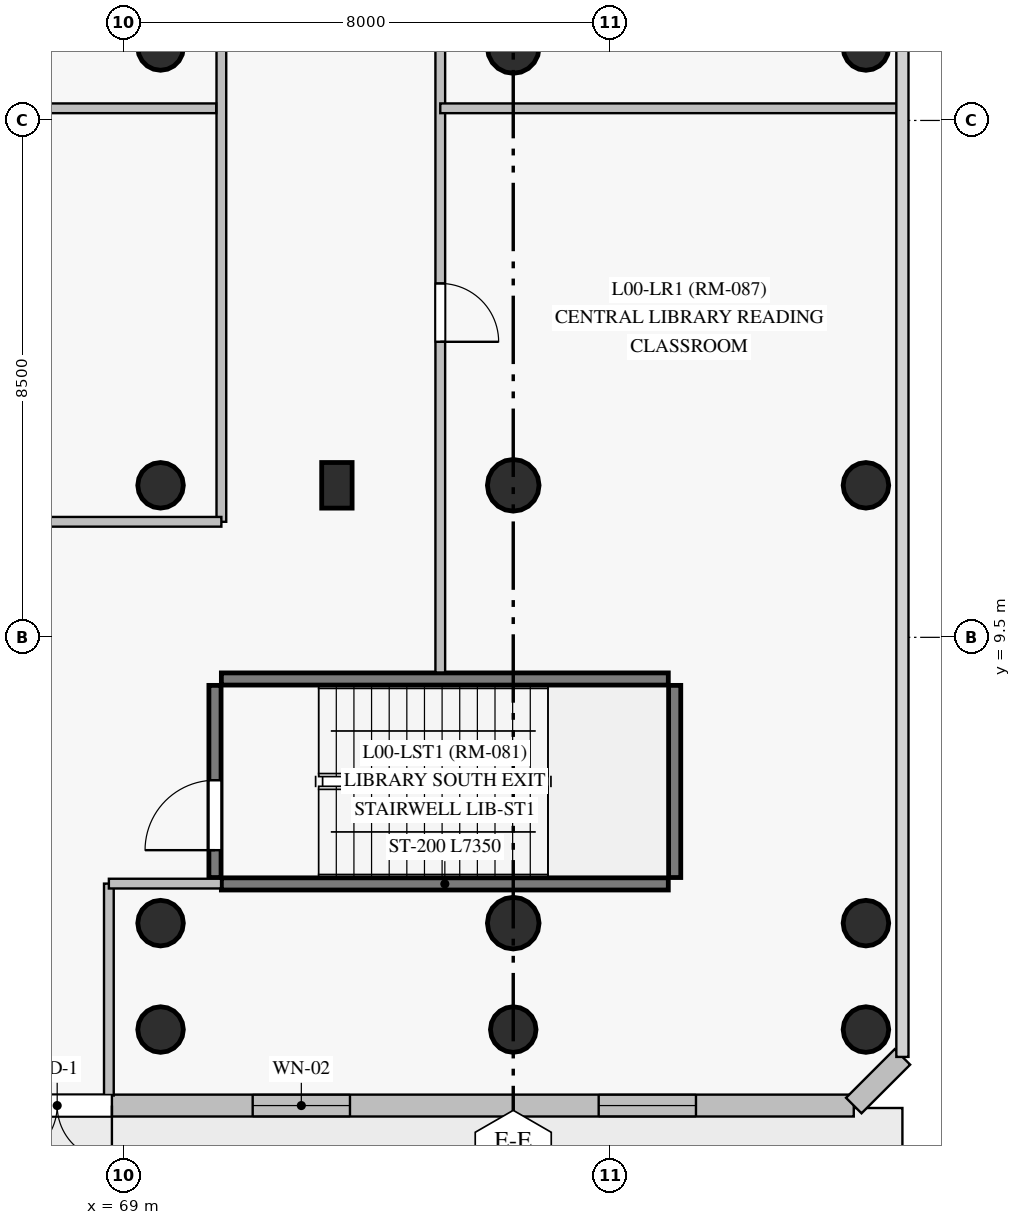
"""IFC4 building model, lengths in metres.
Left out: names, types, materials, properties, quantities, classifications, styles, units other than length and angle.
Written with IfcOpenShell. Run it as: python <this file> out.ifc"""

import sys

from ifc_helpers import new_model, si_unit, direction, frame, frame_2d, origin, origin_with_axes, origin_2d, place, context, subcontext, project, spatial, rectangle, circle, extrude, source, transform, mapped, element, fill, save


model = new_model("IFC4")
c1 = context("Model", 3, precision=1e-05, world=origin(), true_north=direction((0.0, 1.0)))
c2 = subcontext(c1, "Body", "Model", "MODEL_VIEW")
j1 = project(units=[si_unit("LENGTHUNIT", "METRE"), si_unit("PLANEANGLEUNIT", "RADIAN")], contexts=[c1])
p1 = place(None, origin())
s1 = spatial("IfcSite", under=j1, at=p1, CompositionType="ELEMENT")
p2 = place(p1, origin())
s2 = spatial("IfcBuilding", under=s1, at=p2, CompositionType="ELEMENT")
p3 = place(p2, origin())
s3 = spatial("IfcBuildingStorey", under=s2, at=p3, CompositionType="ELEMENT", Elevation=0.0)
m1 = source(origin_with_axes(), c2, "Body", "SweptSolid", [
    extrude(circle(Radius=0.375, at=origin_2d()), origin(), (0.0, 0.0, 1.0), 4.5),
])
for number, where, z_axis, x_axis in (
    (1, (69.6, 3.05, 0.0), (0.0, 0.0, 1.0), (1.0, 0.0, 0.0)),
    (2, (75.4, 3.05, 0.0), (0.0, 0.0, 1.0), (1.0, 0.0, 0.0)),
    (3, (81.2, 3.05, 0.0), (0.0, 0.0, 1.0), (1.0, 0.0, 0.0)),
    (4, (69.6, 4.8, 0.0), (0.0, 0.0, 1.0), (1.0, 0.0, 0.0)),
    (5, (69.6, 12.0, 0.0), (0.0, 0.0, 1.0), (1.0, 0.0, 0.0)),
    (6, (69.6, 19.2, 0.0), (0.0, 0.0, 1.0), (1.0, 0.0, 0.0)),
):
    element("IfcColumn", number, at=place(p3, frame(where, z_axis=z_axis, x_axis=x_axis)), inside=s3, PredefinedType="COLUMN", context=c2, shape_type="MappedRepresentation", body=[
        mapped(m1, transform((0.0, 0.0, 0.0), scale=1.0)),
    ])
m2 = source(origin_with_axes(), c2, "Body", "SweptSolid", [
    extrude(circle(Radius=0.425, at=origin_2d()), origin(), (0.0, 0.0, 1.0), 4.5),
])
for number, where, z_axis, x_axis in (
    (7, (75.4, 4.8, 0.0), (0.0, 0.0, 1.0), (1.0, 0.0, 0.0)),
    (8, (75.4, 12.0, 0.0), (0.0, 0.0, 1.0), (1.0, 0.0, 0.0)),
    (9, (75.4, 19.2, 0.0), (0.0, 0.0, 1.0), (1.0, 0.0, 0.0)),
):
    element("IfcColumn", number, at=place(p3, frame(where, z_axis=z_axis, x_axis=x_axis)), inside=s3, PredefinedType="COLUMN", context=c2, shape_type="MappedRepresentation", body=[
        mapped(m2, transform((0.0, 0.0, 0.0), scale=1.0)),
    ])
for number, where, z_axis, x_axis in (
    (10, (81.2, 4.8, 0.0), (0.0, 0.0, 1.0), (1.0, 0.0, 0.0)),
    (11, (81.2, 12.0, 0.0), (0.0, 0.0, 1.0), (1.0, 0.0, 0.0)),
    (12, (81.2, 19.2, 0.0), (0.0, 0.0, 1.0), (1.0, 0.0, 0.0)),
):
    element("IfcColumn", number, at=place(p3, frame(where, z_axis=z_axis, x_axis=x_axis)), inside=s3, PredefinedType="COLUMN", context=c2, shape_type="MappedRepresentation", body=[
        mapped(m1, transform((0.0, 0.0, 0.0), scale=1.0)),
    ])
m3 = source(origin_with_axes(), c2, "Body", "SweptSolid", [
    extrude(rectangle(XDim=0.5, YDim=0.75, at=origin_2d()), origin(), (0.0, 0.0, 1.0), 4.5),
])
p4 = place(p3, frame((72.5, 12.0, 0.0), z_axis=(0.0, 0.0, 1.0), x_axis=(1.0, 0.0, 0.0)))
e13 = element("IfcColumn", 13, at=p4, inside=s3, PredefinedType="PILASTER", context=c2, shape_type="MappedRepresentation", body=[
    mapped(m3, transform((0.0, 0.0, 0.0), scale=1.0)),
])
p5 = place(p3, frame((81.0, 1.8, 0.0), z_axis=(0.0, 0.0, 1.0), x_axis=(-1.0, 0.0, 0.0)))
e14 = element("IfcWall", 14, at=p5, inside=s3, PredefinedType="SOLIDWALL", context=c2, shape_type="SweptSolid", body=[
    extrude(rectangle(XDim=14.8, YDim=0.36, at=frame_2d((7.4, 0.0))), origin(), (0.0, 0.0, 1.0), 4.2),
])
p6 = place(p5, frame((8.285, 0.0, 0.85)))
e15 = element("IfcOpeningElement", 15, at=p6, cuts=e14, PredefinedType="OPENING", context=c2, shape_type="SweptSolid", body=[
    extrude(rectangle(XDim=1.6, YDim=2.2, at=frame_2d((0.8, 1.1))), frame((0.0, 0.19, 0.0), z_axis=(0.0, -1.0, 0.0), x_axis=(1.0, 0.0, 0.0)), (0.0, 0.0, 1.0), 0.38),
])
p7 = place(p5, frame((2.595, 0.0, 0.85)))
e16 = element("IfcOpeningElement", 16, at=p7, cuts=e14, PredefinedType="OPENING", context=c2, shape_type="SweptSolid", body=[
    extrude(rectangle(XDim=1.6, YDim=2.2, at=frame_2d((0.8, 1.1))), frame((0.0, 0.19, 0.0), z_axis=(0.0, -1.0, 0.0), x_axis=(1.0, 0.0, 0.0)), (0.0, 0.0, 1.0), 0.38),
])
p8 = place(p5, frame((12.2, 0.0, 0.0)))
e17 = element("IfcOpeningElement", 17, at=p8, cuts=e14, PredefinedType="OPENING", context=c2, shape_type="SweptSolid", body=[
    extrude(rectangle(XDim=1.8, YDim=2.3, at=frame_2d((0.9, 1.15))), frame((0.0, 0.19, 0.0), z_axis=(0.0, -1.0, 0.0), x_axis=(1.0, 0.0, 0.0)), (0.0, 0.0, 1.0), 0.38),
])
p9 = place(p3, frame((81.0, 1.8, 0.0), z_axis=(0.0, 0.0, 1.0), x_axis=(0.707106781187, 0.707106781187, 0.0)))
e18 = element("IfcWall", 18, at=p9, inside=s3, PredefinedType="SOLIDWALL", context=c2, shape_type="SweptSolid", body=[
    extrude(rectangle(XDim=1.131, YDim=0.36, at=frame_2d((0.566, 0.0))), origin(), (0.0, 0.0, 1.0), 4.2),
])
for number, where, z_axis, x_axis in (
    (19, (70.6, 5.445, 0.0), (0.0, 0.0, 1.0), (1.0, 0.0, 0.0)),
    (20, (70.6, 8.815, 0.0), (0.0, 0.0, 1.0), (1.0, 0.0, 0.0)),
):
    element("IfcWall", number, at=place(p3, frame(where, z_axis=z_axis, x_axis=x_axis)), inside=s3, PredefinedType="SHEAR", context=c2, shape_type="SweptSolid", body=[
        extrude(rectangle(XDim=7.35, YDim=0.2, at=frame_2d((3.675, 0.0))), origin(), (0.0, 0.0, 1.0), 4.2),
    ])
p10 = place(p3, frame((70.495, 5.55, 0.0), z_axis=(0.0, 0.0, 1.0), x_axis=(0.0, 1.0, 0.0)))
e21 = element("IfcWall", 21, at=p10, inside=s3, PredefinedType="SHEAR", context=c2, shape_type="SweptSolid", body=[
    extrude(rectangle(XDim=3.16, YDim=0.2, at=frame_2d((1.58, 0.0))), origin(), (0.0, 0.0, 1.0), 4.2),
])
p11 = place(p10, frame((0.45, 0.0, 0.0)))
e22 = element("IfcOpeningElement", 22, at=p11, cuts=e21, PredefinedType="OPENING", context=c2, shape_type="SweptSolid", body=[
    extrude(rectangle(XDim=1.15, YDim=2.15, at=frame_2d((0.575, 1.075))), frame((0.0, 0.11, 0.0), z_axis=(0.0, -1.0, 0.0), x_axis=(1.0, 0.0, 0.0)), (0.0, 0.0, 1.0), 0.22),
])
p12 = place(p3, frame((78.055, 5.55, 0.0), z_axis=(0.0, 0.0, 1.0), x_axis=(0.0, 1.0, 0.0)))
e23 = element("IfcWall", 23, at=p12, inside=s3, PredefinedType="SHEAR", context=c2, shape_type="SweptSolid", body=[
    extrude(rectangle(XDim=3.16, YDim=0.2, at=frame_2d((1.58, 0.0))), origin(), (0.0, 0.0, 1.0), 4.2),
])
p13 = place(p3, frame((70.6, 11.4, 0.0), z_axis=(0.0, 0.0, 1.0), x_axis=(0.0, 1.0, 0.0)))
e24 = element("IfcWall", 24, at=p13, inside=s3, PredefinedType="PARTITIONING", context=c2, shape_type="SweptSolid", body=[
    extrude(rectangle(XDim=30.2, YDim=0.16, at=frame_2d((15.1, 0.0))), origin(), (0.0, 0.0, 1.0), 4.2),
])
p14 = place(p3, frame((74.2, 20.6, 0.0), z_axis=(0.0, 0.0, 1.0), x_axis=(0.0, -1.0, 0.0)))
e25 = element("IfcWall", 25, at=p14, inside=s3, PredefinedType="PARTITIONING", context=c2, shape_type="SweptSolid", body=[
    extrude(rectangle(XDim=11.678, YDim=0.16, at=frame_2d((5.839, 0.0))), origin(), (0.0, 0.0, 1.0), 4.2),
])
p15 = place(p14, frame((5.28, 0.0, 0.0)))
e26 = element("IfcOpeningElement", 26, at=p15, cuts=e25, PredefinedType="OPENING", context=c2, shape_type="SweptSolid", body=[
    extrude(rectangle(XDim=0.96, YDim=2.15, at=frame_2d((0.48, 1.075))), frame((0.0, 0.09, 0.0), z_axis=(0.0, -1.0, 0.0), x_axis=(1.0, 0.0, 0.0)), (0.0, 0.0, 1.0), 0.18),
])
p16 = place(p3, frame((74.2, 18.2, 0.0), z_axis=(0.0, 0.0, 1.0), x_axis=(1.0, 0.0, 0.0)))
e27 = element("IfcWall", 27, at=p16, inside=s3, PredefinedType="PARTITIONING", context=c2, shape_type="SweptSolid", body=[
    extrude(rectangle(XDim=7.545, YDim=0.16, at=frame_2d((3.772, 0.0))), origin(), (0.0, 0.0, 1.0), 4.2),
])
p17 = place(p3, frame((65.455, 18.2, 0.0), z_axis=(0.0, 0.0, 1.0), x_axis=(1.0, 0.0, 0.0)))
e28 = element("IfcWall", 28, at=p17, inside=s3, PredefinedType="PARTITIONING", context=c2, shape_type="SweptSolid", body=[
    extrude(rectangle(XDim=5.06, YDim=0.16, at=frame_2d((2.53, 0.0))), origin(), (0.0, 0.0, 1.0), 4.2),
])
p18 = place(p3, frame((66.55, 11.4, 0.0), z_axis=(0.0, 0.0, 1.0), x_axis=(1.0, 0.0, 0.0)))
e29 = element("IfcWall", 29, at=p18, inside=s3, PredefinedType="PARTITIONING", context=c2, shape_type="SweptSolid", body=[
    extrude(rectangle(XDim=4.05, YDim=0.16, at=frame_2d((2.025, 0.0))), origin(), (0.0, 0.0, 1.0), 3.55),
])
p19 = place(p3, frame((68.75, 5.45, 0.0), z_axis=(0.0, 0.0, 1.0), x_axis=(0.0, -1.0, 0.0)))
e30 = element("IfcWall", 30, at=p19, inside=s3, PredefinedType="PARTITIONING", context=c2, shape_type="SweptSolid", body=[
    extrude(rectangle(XDim=3.485, YDim=0.16, at=frame_2d((1.742, 0.0))), origin(), (0.0, 0.0, 1.0), 4.2),
])
p20 = place(p3, frame((70.595, 5.45, 0.0), z_axis=(0.0, 0.0, 1.0), x_axis=(-1.0, 0.0, 0.0)))
e31 = element("IfcWall", 31, at=p20, inside=s3, PredefinedType="PARTITIONING", context=c2, shape_type="SweptSolid", body=[
    extrude(rectangle(XDim=1.845, YDim=0.16, at=frame_2d((0.922, 0.0))), origin(), (0.0, 0.0, 1.0), 3.55),
])
m4 = source(origin_with_axes(), c2, "Body", "SweptSolid", [
    extrude(rectangle(XDim=1.6, YDim=2.2, at=frame_2d((0.8, 1.1))), frame((0.0, 0.03, 0.0), z_axis=(0.0, -1.0, 0.0), x_axis=(1.0, 0.0, 0.0)), (0.0, 0.0, 1.0), 0.06),
])
p21 = place(p6, origin())
e32 = element("IfcWindow", 32, at=p21, inside=s3, PartitioningType="SINGLE_PANEL", PredefinedType="WINDOW", context=c2, shape_type="MappedRepresentation", body=[
    mapped(m4, transform((0.0, 0.0, 0.0), scale=1.0)),
])
fill(e15, e32)
p22 = place(p7, origin())
e33 = element("IfcWindow", 33, at=p22, inside=s3, PartitioningType="SINGLE_PANEL", PredefinedType="WINDOW", context=c2, shape_type="MappedRepresentation", body=[
    mapped(m4, transform((0.0, 0.0, 0.0), scale=1.0)),
])
fill(e16, e33)
m5 = source(origin_with_axes(), c2, "Body", "SweptSolid", [
    extrude(rectangle(XDim=1.8, YDim=2.3, at=frame_2d((0.9, 1.15))), frame((0.0, 0.025, 0.0), z_axis=(0.0, -1.0, 0.0), x_axis=(1.0, 0.0, 0.0)), (0.0, 0.0, 1.0), 0.05),
])
p23 = place(p8, origin())
e34 = element("IfcDoor", 34, at=p23, inside=s3, OperationType="DOUBLE_DOOR_SINGLE_SWING", PredefinedType="DOOR", context=c2, shape_type="MappedRepresentation", body=[
    mapped(m5, transform((0.0, 0.0, 0.0), scale=1.0)),
])
fill(e17, e34)
m6 = source(origin_with_axes(), c2, "Body", "SweptSolid", [
    extrude(rectangle(XDim=1.15, YDim=2.15, at=frame_2d((0.575, 1.075))), frame((0.0, 0.025, 0.0), z_axis=(0.0, -1.0, 0.0), x_axis=(1.0, 0.0, 0.0)), (0.0, 0.0, 1.0), 0.05),
])
p24 = place(p11, origin())
e35 = element("IfcDoor", 35, at=p24, inside=s3, OperationType="SINGLE_SWING_LEFT", PredefinedType="DOOR", context=c2, shape_type="MappedRepresentation", body=[
    mapped(m6, transform((0.0, 0.0, 0.0), scale=1.0)),
])
fill(e22, e35)
m7 = source(origin_with_axes(), c2, "Body", "SweptSolid", [
    extrude(rectangle(XDim=0.96, YDim=2.15, at=frame_2d((0.48, 1.075))), frame((0.0, 0.025, 0.0), z_axis=(0.0, -1.0, 0.0), x_axis=(1.0, 0.0, 0.0)), (0.0, 0.0, 1.0), 0.05),
])
p25 = place(p15, origin())
e36 = element("IfcDoor", 36, at=p25, inside=s3, OperationType="SINGLE_SWING_RIGHT", PredefinedType="DOOR", context=c2, shape_type="MappedRepresentation", body=[
    mapped(m7, transform((0.0, 0.0, 0.0), scale=1.0)),
])
fill(e26, e36)
save(model, sys.argv[1])
